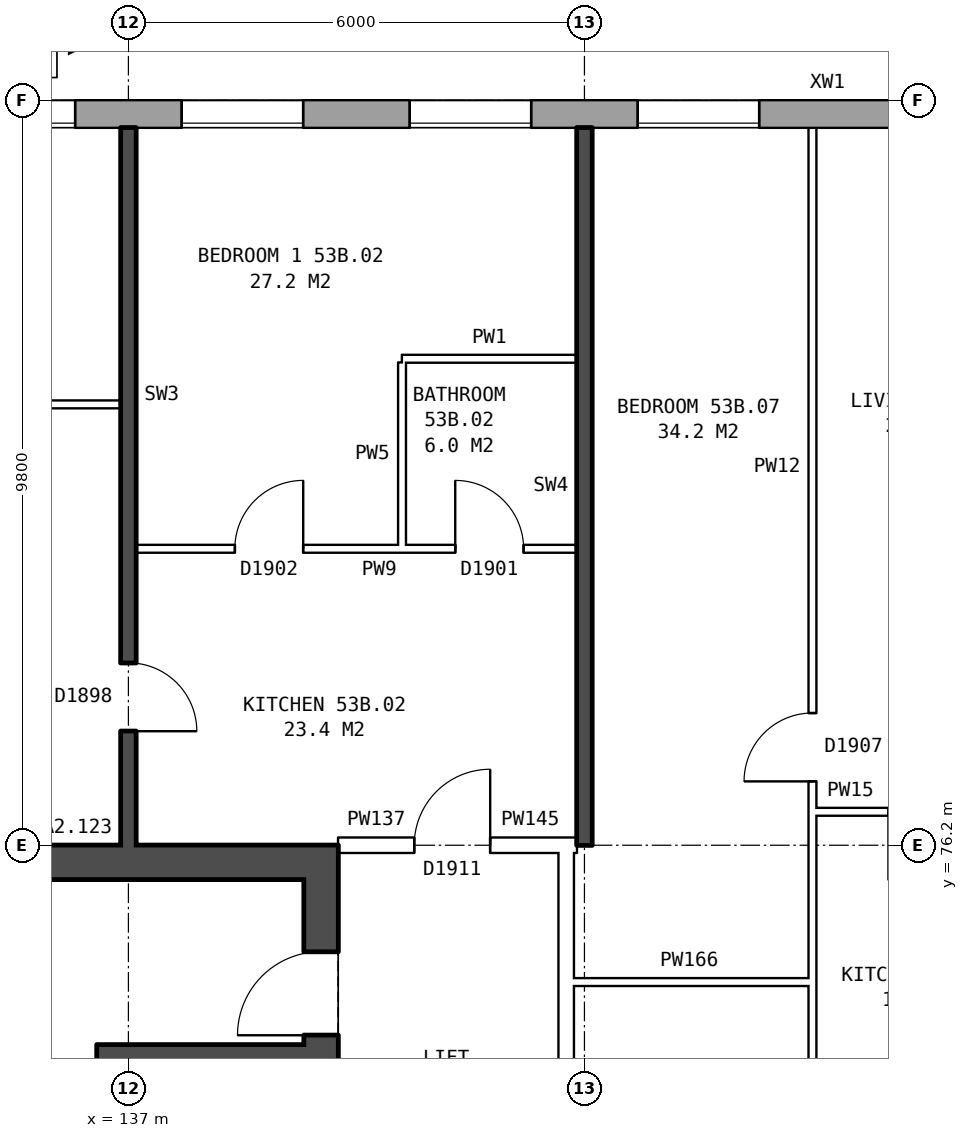
"""IFC4 building model, lengths in metres.
Left out: names, types, materials, properties, quantities, classifications, styles, units other than length and angle.
Written with IfcOpenShell. Run it as: python <this file> out.ifc"""

import sys

from ifc_helpers import new_model, si_unit, direction, frame, frame_2d, origin, place, context, subcontext, project, spatial, rectangle, extrude, element, fill, save


model = new_model("IFC4")
c1 = context("Model", 3, precision=1e-05, world=origin(), true_north=direction((0.0, 1.0)))
c2 = subcontext(c1, "Body", "Model", "MODEL_VIEW")
j1 = project(units=[si_unit("LENGTHUNIT", "METRE"), si_unit("PLANEANGLEUNIT", "RADIAN")], contexts=[c1])
p1 = place(None, origin())
s1 = spatial("IfcSite", under=j1, at=p1, CompositionType="ELEMENT")
p2 = place(p1, origin())
s2 = spatial("IfcBuilding", under=s1, at=p2, CompositionType="ELEMENT")
p3 = place(p2, frame((0.0, 0.0, 188.2)))
s3 = spatial("IfcBuildingStorey", under=s2, at=p3, CompositionType="ELEMENT", Elevation=188.2)
p4 = place(p3, frame((167.175, 85.82, 0.0), z_axis=(0.0, 0.0, 1.0), x_axis=(-1.0, 0.0, 0.0)))
e1 = element("IfcWall", 1, at=p4, inside=s3, PredefinedType="STANDARD", context=c2, shape_type="SweptSolid", body=[
    extrude(rectangle(XDim=33.101, YDim=0.36, at=frame_2d((16.55, 0.0))), origin(), (0.0, 0.0, 1.0), 2.85),
])
p5 = place(p4, frame((0.875, 0.0, 0.8)))
e2 = element("IfcOpeningElement", 2, at=p5, cuts=e1, PredefinedType="OPENING", context=c2, shape_type="SweptSolid", body=[
    extrude(rectangle(XDim=1.6, YDim=1.8, at=frame_2d((0.8, 0.9))), frame((0.0, 0.19, 0.0), z_axis=(0.0, -1.0, 0.0), x_axis=(1.0, 0.0, 0.0)), (0.0, 0.0, 1.0), 0.38),
])
p6 = place(p4, frame((3.875, 0.0, 0.8)))
e3 = element("IfcOpeningElement", 3, at=p6, cuts=e1, PredefinedType="OPENING", context=c2, shape_type="SweptSolid", body=[
    extrude(rectangle(XDim=1.6, YDim=1.8, at=frame_2d((0.8, 0.9))), frame((0.0, 0.19, 0.0), z_axis=(0.0, -1.0, 0.0), x_axis=(1.0, 0.0, 0.0)), (0.0, 0.0, 1.0), 0.38),
])
p7 = place(p4, frame((6.875, 0.0, 0.8)))
e4 = element("IfcOpeningElement", 4, at=p7, cuts=e1, PredefinedType="OPENING", context=c2, shape_type="SweptSolid", body=[
    extrude(rectangle(XDim=1.6, YDim=1.8, at=frame_2d((0.8, 0.9))), frame((0.0, 0.19, 0.0), z_axis=(0.0, -1.0, 0.0), x_axis=(1.0, 0.0, 0.0)), (0.0, 0.0, 1.0), 0.38),
])
p8 = place(p4, frame((9.875, 0.0, 0.8)))
e5 = element("IfcOpeningElement", 5, at=p8, cuts=e1, PredefinedType="OPENING", context=c2, shape_type="SweptSolid", body=[
    extrude(rectangle(XDim=1.6, YDim=1.8, at=frame_2d((0.8, 0.9))), frame((0.0, 0.19, 0.0), z_axis=(0.0, -1.0, 0.0), x_axis=(1.0, 0.0, 0.0)), (0.0, 0.0, 1.0), 0.38),
])
p9 = place(p4, frame((12.975, 0.0, 0.15)))
e6 = element("IfcOpeningElement", 6, at=p9, cuts=e1, PredefinedType="OPENING", context=c2, shape_type="SweptSolid", body=[
    extrude(rectangle(XDim=0.6, YDim=0.9, at=frame_2d((0.3, 0.45))), frame((0.0, 0.19, 0.0), z_axis=(0.0, -1.0, 0.0), x_axis=(1.0, 0.0, 0.0)), (0.0, 0.0, 1.0), 0.38),
])
p10 = place(p4, frame((15.875, 0.0, 0.8)))
e7 = element("IfcOpeningElement", 7, at=p10, cuts=e1, PredefinedType="OPENING", context=c2, shape_type="SweptSolid", body=[
    extrude(rectangle(XDim=1.6, YDim=1.8, at=frame_2d((0.8, 0.9))), frame((0.0, 0.19, 0.0), z_axis=(0.0, -1.0, 0.0), x_axis=(1.0, 0.0, 0.0)), (0.0, 0.0, 1.0), 0.38),
])
p11 = place(p4, frame((18.375, 0.0, 0.35)))
e8 = element("IfcOpeningElement", 8, at=p11, cuts=e1, PredefinedType="OPENING", context=c2, shape_type="SweptSolid", body=[
    extrude(rectangle(XDim=0.8, YDim=1.8, at=frame_2d((0.4, 0.9))), frame((0.0, 0.19, 0.0), z_axis=(0.0, -1.0, 0.0), x_axis=(1.0, 0.0, 0.0)), (0.0, 0.0, 1.0), 0.38),
])
p12 = place(p4, frame((21.875, 0.0, 0.8)))
e9 = element("IfcOpeningElement", 9, at=p12, cuts=e1, PredefinedType="OPENING", context=c2, shape_type="SweptSolid", body=[
    extrude(rectangle(XDim=1.6, YDim=1.8, at=frame_2d((0.8, 0.9))), frame((0.0, 0.19, 0.0), z_axis=(0.0, -1.0, 0.0), x_axis=(1.0, 0.0, 0.0)), (0.0, 0.0, 1.0), 0.38),
])
p13 = place(p4, frame((24.875, 0.0, 0.8)))
e10 = element("IfcOpeningElement", 10, at=p13, cuts=e1, PredefinedType="OPENING", context=c2, shape_type="SweptSolid", body=[
    extrude(rectangle(XDim=1.6, YDim=1.8, at=frame_2d((0.8, 0.9))), frame((0.0, 0.19, 0.0), z_axis=(0.0, -1.0, 0.0), x_axis=(1.0, 0.0, 0.0)), (0.0, 0.0, 1.0), 0.38),
])
p14 = place(p4, frame((27.875, 0.0, 0.8)))
e11 = element("IfcOpeningElement", 11, at=p14, cuts=e1, PredefinedType="OPENING", context=c2, shape_type="SweptSolid", body=[
    extrude(rectangle(XDim=1.6, YDim=1.8, at=frame_2d((0.8, 0.9))), frame((0.0, 0.19, 0.0), z_axis=(0.0, -1.0, 0.0), x_axis=(1.0, 0.0, 0.0)), (0.0, 0.0, 1.0), 0.38),
])
p15 = place(p4, frame((30.875, 0.0, 0.8)))
e12 = element("IfcOpeningElement", 12, at=p15, cuts=e1, PredefinedType="OPENING", context=c2, shape_type="SweptSolid", body=[
    extrude(rectangle(XDim=1.6, YDim=1.8, at=frame_2d((0.8, 0.9))), frame((0.0, 0.19, 0.0), z_axis=(0.0, -1.0, 0.0), x_axis=(1.0, 0.0, 0.0)), (0.0, 0.0, 1.0), 0.38),
])
p16 = place(p4, frame((13.875, 0.0, 0.25)))
e13 = element("IfcOpeningElement", 13, at=p16, cuts=e1, PredefinedType="OPENING", context=c2, shape_type="SweptSolid", body=[
    extrude(rectangle(XDim=1.0, YDim=1.8, at=frame_2d((0.5, 0.9))), frame((0.0, 0.19, 0.0), z_axis=(0.0, -1.0, 0.0), x_axis=(1.0, 0.0, 0.0)), (0.0, 0.0, 1.0), 0.38),
])
p17 = place(p4, frame((19.475, 0.0, 0.15)))
e14 = element("IfcOpeningElement", 14, at=p17, cuts=e1, PredefinedType="OPENING", context=c2, shape_type="SweptSolid", body=[
    extrude(rectangle(XDim=0.6, YDim=0.9, at=frame_2d((0.3, 0.45))), frame((0.0, 0.19, 0.0), z_axis=(0.0, -1.0, 0.0), x_axis=(1.0, 0.0, 0.0)), (0.0, 0.0, 1.0), 0.38),
])
p18 = place(p3, frame((139.535, 63.8, 0.0), z_axis=(0.0, 0.0, 1.0), x_axis=(0.0, 1.0, 0.0)))
e15 = element("IfcWall", 15, at=p18, inside=s3, PredefinedType="SHEAR", context=c2, shape_type="SweptSolid", body=[
    extrude(rectangle(XDim=12.4, YDim=0.45, at=frame_2d((6.2, 0.0))), origin(), (0.0, 0.0, 1.0), 2.85),
])
p19 = place(p18, frame((1.325, 0.0, 0.0)))
e16 = element("IfcOpeningElement", 16, at=p19, cuts=e15, PredefinedType="OPENING", context=c2, shape_type="SweptSolid", body=[
    extrude(rectangle(XDim=1.1, YDim=2.1, at=frame_2d((0.55, 1.05))), frame((0.0, 0.235, 0.0), z_axis=(0.0, -1.0, 0.0), x_axis=(1.0, 0.0, 0.0)), (0.0, 0.0, 1.0), 0.47),
])
p20 = place(p18, frame((3.6, 0.0, 0.0)))
e17 = element("IfcOpeningElement", 17, at=p20, cuts=e15, PredefinedType="OPENING", context=c2, shape_type="SweptSolid", body=[
    extrude(rectangle(XDim=1.1, YDim=2.1, at=frame_2d((0.55, 1.05))), frame((0.0, 0.235, 0.0), z_axis=(0.0, -1.0, 0.0), x_axis=(1.0, 0.0, 0.0)), (0.0, 0.0, 1.0), 0.47),
])
p21 = place(p18, frame((5.8, 0.0, 0.0)))
e18 = element("IfcOpeningElement", 18, at=p21, cuts=e15, PredefinedType="OPENING", context=c2, shape_type="SweptSolid", body=[
    extrude(rectangle(XDim=1.1, YDim=2.1, at=frame_2d((0.55, 1.05))), frame((0.0, 0.235, 0.0), z_axis=(0.0, -1.0, 0.0), x_axis=(1.0, 0.0, 0.0)), (0.0, 0.0, 1.0), 0.47),
])
p22 = place(p18, frame((9.9, 0.0, 0.0)))
e19 = element("IfcOpeningElement", 19, at=p22, cuts=e15, PredefinedType="OPENING", context=c2, shape_type="SweptSolid", body=[
    extrude(rectangle(XDim=1.1, YDim=2.1, at=frame_2d((0.55, 1.05))), frame((0.0, 0.235, 0.0), z_axis=(0.0, -1.0, 0.0), x_axis=(1.0, 0.0, 0.0)), (0.0, 0.0, 1.0), 0.47),
])
p23 = place(p18, frame((8.125, 0.0, 0.0)))
e20 = element("IfcOpeningElement", 20, at=p23, cuts=e15, PredefinedType="OPENING", context=c2, shape_type="SweptSolid", body=[
    extrude(rectangle(XDim=0.85, YDim=2.1, at=frame_2d((0.425, 1.05))), frame((0.0, 0.235, 0.0), z_axis=(0.0, -1.0, 0.0), x_axis=(1.0, 0.0, 0.0)), (0.0, 0.0, 1.0), 0.47),
])
p24 = place(p3, frame((139.31, 75.975, 0.0), z_axis=(0.0, 0.0, 1.0), x_axis=(-1.0, 0.0, 0.0)))
e21 = element("IfcWall", 21, at=p24, inside=s3, PredefinedType="SHEAR", context=c2, shape_type="SweptSolid", body=[
    extrude(rectangle(XDim=7.5, YDim=0.45, at=frame_2d((3.75, 0.0))), origin(), (0.0, 0.0, 1.0), 2.85),
])
p25 = place(p3, frame((139.31, 73.45, 0.0), z_axis=(0.0, 0.0, 1.0), x_axis=(-1.0, 0.0, 0.0)))
e22 = element("IfcWall", 22, at=p25, inside=s3, PredefinedType="SHEAR", context=c2, shape_type="SweptSolid", body=[
    extrude(rectangle(XDim=2.475, YDim=0.25, at=frame_2d((1.238, 0.0))), origin(), (0.0, 0.0, 1.0), 2.85),
])
p26 = place(p3, frame((136.71, 71.375, 0.0), z_axis=(0.0, 0.0, 1.0), x_axis=(0.0, 1.0, 0.0)))
e23 = element("IfcWall", 23, at=p26, inside=s3, PredefinedType="SHEAR", context=c2, shape_type="SweptSolid", body=[
    extrude(rectangle(XDim=2.2, YDim=0.25, at=frame_2d((1.1, 0.0))), origin(), (0.0, 0.0, 1.0), 2.85),
])
p27 = place(p3, frame((142.76, 63.9, 0.0), z_axis=(0.0, 0.0, 1.0), x_axis=(0.0, 1.0, 0.0)))
e24 = element("IfcWall", 24, at=p27, inside=s3, PredefinedType="PARTITIONING", context=c2, shape_type="SweptSolid", body=[
    extrude(rectangle(XDim=12.2, YDim=0.2, at=frame_2d((6.1, 0.0))), origin(), (0.0, 0.0, 1.0), 2.85),
])
p28 = place(p27, frame((5.1, 0.0, 0.0)))
e25 = element("IfcOpeningElement", 25, at=p28, cuts=e24, PredefinedType="OPENING", context=c2, shape_type="SweptSolid", body=[
    extrude(rectangle(XDim=2.0, YDim=2.1, at=frame_2d((1.0, 1.05))), frame((0.0, 0.11, 0.0), z_axis=(0.0, -1.0, 0.0), x_axis=(1.0, 0.0, 0.0)), (0.0, 0.0, 1.0), 0.22),
])
p29 = place(p3, frame((142.76, 74.4, 0.0), z_axis=(0.0, 0.0, 1.0), x_axis=(1.0, 0.0, 0.0)))
e26 = element("IfcWall", 26, at=p29, inside=s3, PredefinedType="PARTITIONING", context=c2, shape_type="SweptSolid", body=[
    extrude(rectangle(XDim=3.24, YDim=0.1, at=frame_2d((1.62, 0.0))), origin(), (0.0, 0.0, 1.0), 2.85),
])
p30 = place(p3, frame((139.76, 76.2, 0.0), z_axis=(0.0, 0.0, 1.0), x_axis=(1.0, 0.0, 0.0)))
e27 = element("IfcWall", 27, at=p30, inside=s3, PredefinedType="PARTITIONING", context=c2, shape_type="SweptSolid", body=[
    extrude(rectangle(XDim=3.0, YDim=0.2, at=frame_2d((1.5, 0.0))), origin(), (0.0, 0.0, 1.0), 2.85),
])
p31 = place(p30, frame((1.0, 0.0, 0.0)))
e28 = element("IfcOpeningElement", 28, at=p31, cuts=e27, PredefinedType="OPENING", context=c2, shape_type="SweptSolid", body=[
    extrude(rectangle(XDim=1.0, YDim=2.1, at=frame_2d((0.5, 1.05))), frame((0.0, 0.11, 0.0), z_axis=(0.0, -1.0, 0.0), x_axis=(1.0, 0.0, 0.0)), (0.0, 0.0, 1.0), 0.22),
])
p32 = place(p3, frame((142.76, 76.2, 0.0), z_axis=(0.0, 0.0, 1.0), x_axis=(1.0, 0.0, 0.0)))
e29 = element("IfcWall", 29, at=p32, inside=s3, PredefinedType="PARTITIONING", context=c2, shape_type="SweptSolid", body=[
    extrude(rectangle(XDim=0.14, YDim=0.2, at=frame_2d((0.07, 0.0))), origin(), (0.0, 0.0, 1.0), 2.85),
])
p33 = place(p3, frame((146.0, 76.64, 0.0), z_axis=(0.0, 0.0, 1.0), x_axis=(1.0, 0.0, 0.0)))
e30 = element("IfcWall", 30, at=p33, inside=s3, PredefinedType="PARTITIONING", context=c2, shape_type="SweptSolid", body=[
    extrude(rectangle(XDim=2.9, YDim=0.1, at=frame_2d((1.45, 0.0))), origin(), (0.0, 0.0, 1.0), 2.85),
])
p34 = place(p33, frame((1.0, 0.0, 0.0)))
e31 = element("IfcOpeningElement", 31, at=p34, cuts=e30, PredefinedType="OPENING", context=c2, shape_type="SweptSolid", body=[
    extrude(rectangle(XDim=0.9, YDim=2.1, at=frame_2d((0.45, 1.05))), frame((0.0, 0.06, 0.0), z_axis=(0.0, -1.0, 0.0), x_axis=(1.0, 0.0, 0.0)), (0.0, 0.0, 1.0), 0.12),
])
p35 = place(p3, frame((137.1, 80.1, 0.0), z_axis=(0.0, 0.0, 1.0), x_axis=(1.0, 0.0, 0.0)))
e32 = element("IfcWall", 32, at=p35, inside=s3, PredefinedType="PARTITIONING", context=c2, shape_type="SweptSolid", body=[
    extrude(rectangle(XDim=5.8, YDim=0.1, at=frame_2d((2.9, 0.0))), origin(), (0.0, 0.0, 1.0), 2.85),
])
p36 = place(p35, frame((1.3, 0.0, 0.0)))
e33 = element("IfcOpeningElement", 33, at=p36, cuts=e32, PredefinedType="OPENING", context=c2, shape_type="SweptSolid", body=[
    extrude(rectangle(XDim=0.9, YDim=2.1, at=frame_2d((0.45, 1.05))), frame((0.0, 0.06, 0.0), z_axis=(0.0, -1.0, 0.0), x_axis=(1.0, 0.0, 0.0)), (0.0, 0.0, 1.0), 0.12),
])
p37 = place(p35, frame((4.2, 0.0, 0.0)))
e34 = element("IfcOpeningElement", 34, at=p37, cuts=e32, PredefinedType="OPENING", context=c2, shape_type="SweptSolid", body=[
    extrude(rectangle(XDim=0.9, YDim=2.1, at=frame_2d((0.45, 1.05))), frame((0.0, 0.06, 0.0), z_axis=(0.0, -1.0, 0.0), x_axis=(1.0, 0.0, 0.0)), (0.0, 0.0, 1.0), 0.12),
])
p38 = place(p3, frame((131.36, 82.0, 0.0), z_axis=(0.0, 0.0, 1.0), x_axis=(1.0, 0.0, 0.0)))
e35 = element("IfcWall", 35, at=p38, inside=s3, PredefinedType="PARTITIONING", context=c2, shape_type="SweptSolid", body=[
    extrude(rectangle(XDim=5.54, YDim=0.1, at=frame_2d((2.77, 0.0))), origin(), (0.0, 0.0, 1.0), 2.85),
])
p39 = place(p38, frame((2.32, 0.0, 0.0)))
e36 = element("IfcOpeningElement", 36, at=p39, cuts=e35, PredefinedType="OPENING", context=c2, shape_type="SweptSolid", body=[
    extrude(rectangle(XDim=0.9, YDim=2.1, at=frame_2d((0.45, 1.05))), frame((0.0, 0.06, 0.0), z_axis=(0.0, -1.0, 0.0), x_axis=(1.0, 0.0, 0.0)), (0.0, 0.0, 1.0), 0.12),
])
p40 = place(p3, frame((140.6, 82.6, 0.0), z_axis=(0.0, 0.0, 1.0), x_axis=(1.0, 0.0, 0.0)))
e37 = element("IfcWall", 37, at=p40, inside=s3, PredefinedType="PARTITIONING", context=c2, shape_type="SweptSolid", body=[
    extrude(rectangle(XDim=2.3, YDim=0.1, at=frame_2d((1.15, 0.0))), origin(), (0.0, 0.0, 1.0), 2.85),
])
p41 = place(p3, frame((137.0, 76.2, 0.0), z_axis=(0.0, 0.0, 1.0), x_axis=(0.0, 1.0, 0.0)))
e38 = element("IfcWall", 38, at=p41, inside=s3, PredefinedType="SOLIDWALL", context=c2, shape_type="SweptSolid", body=[
    extrude(rectangle(XDim=9.44, YDim=0.2, at=frame_2d((4.72, 0.0))), origin(), (0.0, 0.0, 1.0), 2.85),
])
p42 = place(p41, frame((1.5, 0.0, 0.0)))
e39 = element("IfcOpeningElement", 39, at=p42, cuts=e38, PredefinedType="OPENING", context=c2, shape_type="SweptSolid", body=[
    extrude(rectangle(XDim=0.9, YDim=2.1, at=frame_2d((0.45, 1.05))), frame((0.0, 0.11, 0.0), z_axis=(0.0, -1.0, 0.0), x_axis=(1.0, 0.0, 0.0)), (0.0, 0.0, 1.0), 0.22),
])
p43 = place(p3, frame((140.6, 80.15, 0.0), z_axis=(0.0, 0.0, 1.0), x_axis=(0.0, 1.0, 0.0)))
e40 = element("IfcWall", 40, at=p43, inside=s3, PredefinedType="PARTITIONING", context=c2, shape_type="SweptSolid", body=[
    extrude(rectangle(XDim=2.4, YDim=0.1, at=frame_2d((1.2, 0.0))), origin(), (0.0, 0.0, 1.0), 2.85),
])
p44 = place(p3, frame((143.0, 76.2, 0.0), z_axis=(0.0, 0.0, 1.0), x_axis=(0.0, 1.0, 0.0)))
e41 = element("IfcWall", 41, at=p44, inside=s3, PredefinedType="SOLIDWALL", context=c2, shape_type="SweptSolid", body=[
    extrude(rectangle(XDim=9.44, YDim=0.2, at=frame_2d((4.72, 0.0))), origin(), (0.0, 0.0, 1.0), 2.85),
])
p45 = place(p3, frame((146.0, 71.3, 0.0), z_axis=(0.0, 0.0, 1.0), x_axis=(0.0, 1.0, 0.0)))
e42 = element("IfcWall", 42, at=p45, inside=s3, PredefinedType="PARTITIONING", context=c2, shape_type="SweptSolid", body=[
    extrude(rectangle(XDim=14.34, YDim=0.1, at=frame_2d((7.17, 0.0))), origin(), (0.0, 0.0, 1.0), 2.85),
])
p46 = place(p45, frame((5.74, 0.0, 0.0)))
e43 = element("IfcOpeningElement", 43, at=p46, cuts=e42, PredefinedType="OPENING", context=c2, shape_type="SweptSolid", body=[
    extrude(rectangle(XDim=0.9, YDim=2.1, at=frame_2d((0.45, 1.05))), frame((0.0, 0.06, 0.0), z_axis=(0.0, -1.0, 0.0), x_axis=(1.0, 0.0, 0.0)), (0.0, 0.0, 1.0), 0.12),
])
p47 = place(p45, frame((0.4, 0.0, 0.0)))
e44 = element("IfcOpeningElement", 44, at=p47, cuts=e42, PredefinedType="OPENING", context=c2, shape_type="SweptSolid", body=[
    extrude(rectangle(XDim=0.9, YDim=2.1, at=frame_2d((0.45, 1.05))), frame((0.0, 0.06, 0.0), z_axis=(0.0, -1.0, 0.0), x_axis=(1.0, 0.0, 0.0)), (0.0, 0.0, 1.0), 0.12),
])
p48 = place(p12, origin())
e45 = element("IfcWindow", 45, at=p48, inside=s3, PartitioningType="SINGLE_PANEL", PredefinedType="WINDOW", context=c2, shape_type="SweptSolid", body=[
    extrude(rectangle(XDim=1.6, YDim=1.8, at=frame_2d((0.8, 0.9))), frame((0.0, 0.15, 0.0), z_axis=(0.0, -1.0, 0.0), x_axis=(1.0, 0.0, 0.0)), (0.0, 0.0, 1.0), 0.06),
])
fill(e9, e45)
p49 = place(p13, origin())
e46 = element("IfcWindow", 46, at=p49, inside=s3, PartitioningType="SINGLE_PANEL", PredefinedType="WINDOW", context=c2, shape_type="SweptSolid", body=[
    extrude(rectangle(XDim=1.6, YDim=1.8, at=frame_2d((0.8, 0.9))), frame((0.0, 0.15, 0.0), z_axis=(0.0, -1.0, 0.0), x_axis=(1.0, 0.0, 0.0)), (0.0, 0.0, 1.0), 0.06),
])
fill(e10, e46)
p50 = place(p14, origin())
e47 = element("IfcWindow", 47, at=p50, inside=s3, PartitioningType="SINGLE_PANEL", PredefinedType="WINDOW", context=c2, shape_type="SweptSolid", body=[
    extrude(rectangle(XDim=1.6, YDim=1.8, at=frame_2d((0.8, 0.9))), frame((0.0, 0.15, 0.0), z_axis=(0.0, -1.0, 0.0), x_axis=(1.0, 0.0, 0.0)), (0.0, 0.0, 1.0), 0.06),
])
fill(e11, e47)
p51 = place(p15, origin())
e48 = element("IfcWindow", 48, at=p51, inside=s3, PartitioningType="SINGLE_PANEL", PredefinedType="WINDOW", context=c2, shape_type="SweptSolid", body=[
    extrude(rectangle(XDim=1.6, YDim=1.8, at=frame_2d((0.8, 0.9))), frame((0.0, 0.15, 0.0), z_axis=(0.0, -1.0, 0.0), x_axis=(1.0, 0.0, 0.0)), (0.0, 0.0, 1.0), 0.06),
])
fill(e12, e48)
p52 = place(p22, origin())
e49 = element("IfcDoor", 49, at=p52, inside=s3, OperationType="SINGLE_SWING_LEFT", PredefinedType="DOOR", context=c2, shape_type="SweptSolid", body=[
    extrude(rectangle(XDim=1.1, YDim=2.1, at=frame_2d((0.55, 1.05))), frame((0.0, 0.21, 0.0), z_axis=(0.0, -1.0, 0.0), x_axis=(1.0, 0.0, 0.0)), (0.0, 0.0, 1.0), 0.05),
])
fill(e19, e49)
p53 = place(p36, origin())
e50 = element("IfcDoor", 50, at=p53, inside=s3, OperationType="SINGLE_SWING_RIGHT", PredefinedType="DOOR", context=c2, shape_type="SweptSolid", body=[
    extrude(rectangle(XDim=0.9, YDim=2.1, at=frame_2d((0.45, 1.05))), frame((0.0, 0.025, 0.0), z_axis=(0.0, -1.0, 0.0), x_axis=(1.0, 0.0, 0.0)), (0.0, 0.0, 1.0), 0.05),
])
fill(e33, e50)
p54 = place(p31, origin())
e51 = element("IfcDoor", 51, at=p54, inside=s3, OperationType="SINGLE_SWING_RIGHT", PredefinedType="DOOR", context=c2, shape_type="SweptSolid", body=[
    extrude(rectangle(XDim=1.0, YDim=2.1, at=frame_2d((0.5, 1.05))), frame((0.0, 0.025, 0.0), z_axis=(0.0, -1.0, 0.0), x_axis=(1.0, 0.0, 0.0)), (0.0, 0.0, 1.0), 0.05),
])
fill(e28, e51)
p55 = place(p42, frame((0.9, 0.0, 0.0), z_axis=(0.0, 0.0, 1.0), x_axis=(-1.0, 0.0, 0.0)))
e52 = element("IfcDoor", 52, at=p55, inside=s3, OperationType="SINGLE_SWING_RIGHT", PredefinedType="DOOR", context=c2, shape_type="SweptSolid", body=[
    extrude(rectangle(XDim=0.9, YDim=2.1, at=frame_2d((0.45, 1.05))), frame((0.0, 0.025, 0.0), z_axis=(0.0, -1.0, 0.0), x_axis=(1.0, 0.0, 0.0)), (0.0, 0.0, 1.0), 0.05),
])
fill(e39, e52)
p56 = place(p37, origin())
e53 = element("IfcDoor", 53, at=p56, inside=s3, OperationType="SINGLE_SWING_LEFT", PredefinedType="DOOR", context=c2, shape_type="SweptSolid", body=[
    extrude(rectangle(XDim=0.9, YDim=2.1, at=frame_2d((0.45, 1.05))), frame((0.0, 0.025, 0.0), z_axis=(0.0, -1.0, 0.0), x_axis=(1.0, 0.0, 0.0)), (0.0, 0.0, 1.0), 0.05),
])
fill(e34, e53)
p57 = place(p46, origin())
e54 = element("IfcDoor", 54, at=p57, inside=s3, OperationType="SINGLE_SWING_LEFT", PredefinedType="DOOR", context=c2, shape_type="SweptSolid", body=[
    extrude(rectangle(XDim=0.9, YDim=2.1, at=frame_2d((0.45, 1.05))), frame((0.0, 0.025, 0.0), z_axis=(0.0, -1.0, 0.0), x_axis=(1.0, 0.0, 0.0)), (0.0, 0.0, 1.0), 0.05),
])
fill(e43, e54)
save(model, sys.argv[1])
